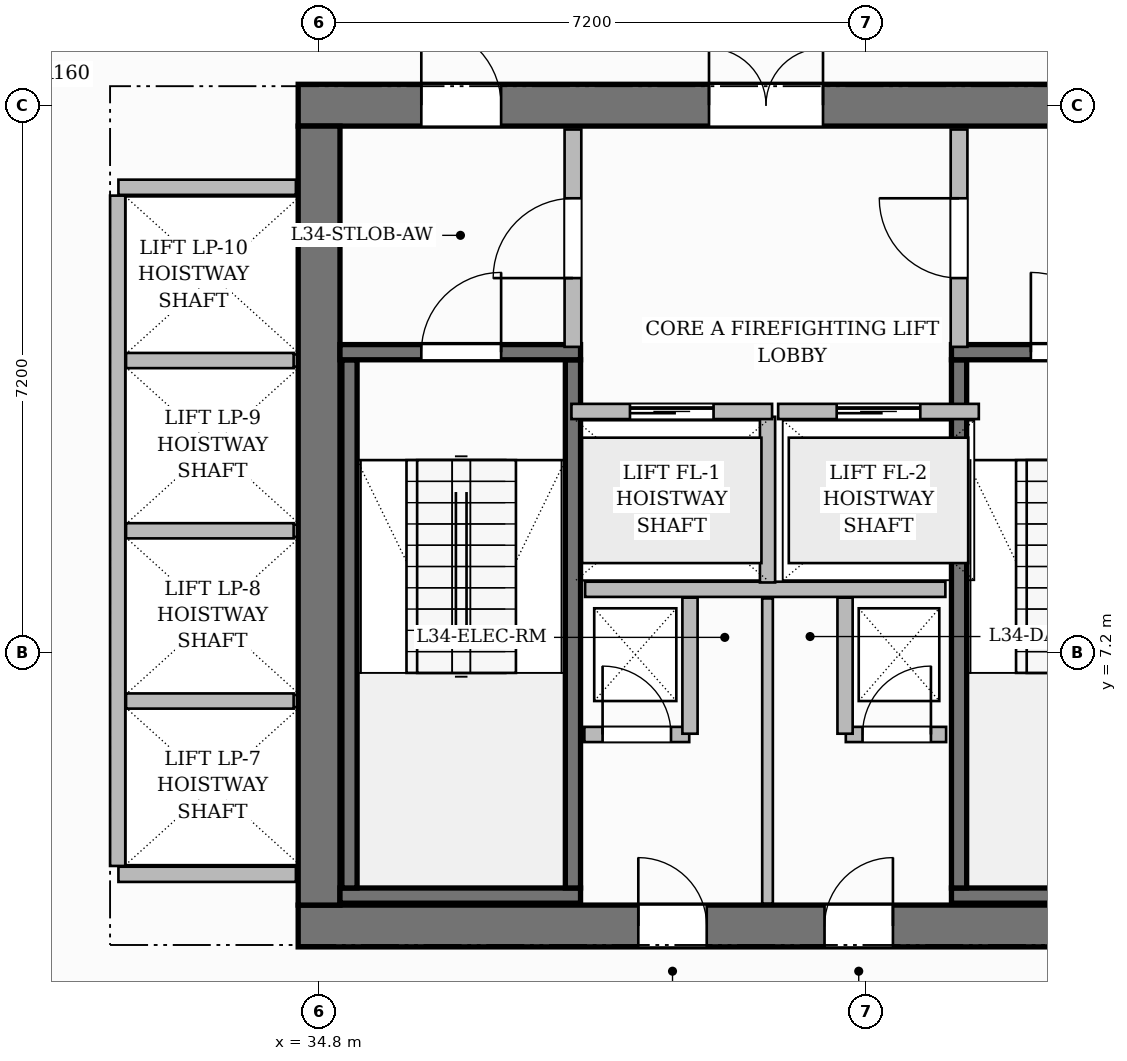
"""IFC4 building model, lengths in metres.
Left out: names, types, materials, properties, quantities, classifications, styles, units other than length and angle.
Written with IfcOpenShell. Run it as: python <this file> out.ifc"""

import sys

from ifc_helpers import new_model, si_unit, direction, frame, frame_2d, origin, place, context, subcontext, project, spatial, rectangle, extrude, source, transform, mapped, element, fill, save


model = new_model("IFC4")
c1 = context("Model", 3, precision=1e-05, world=origin(), true_north=direction((0.0, 1.0)))
c2 = subcontext(c1, "Body", "Model", "MODEL_VIEW")
j1 = project(units=[si_unit("LENGTHUNIT", "METRE"), si_unit("PLANEANGLEUNIT", "RADIAN")], contexts=[c1])
p1 = place(None, origin())
s1 = spatial("IfcSite", under=j1, at=p1, CompositionType="ELEMENT")
p2 = place(p1, origin())
s2 = spatial("IfcBuilding", under=s1, at=p2, CompositionType="ELEMENT")
p3 = place(p2, frame((0.0, 0.0, 137.7)))
s3 = spatial("IfcBuildingStorey", under=s2, at=p3, CompositionType="ELEMENT", Elevation=137.7)
p4 = place(p3, frame((34.525, 3.6, 0.0), z_axis=(0.0, 0.0, 1.0), x_axis=(1.0, 0.0, 0.0)))
e1 = element("IfcWall", 1, at=p4, inside=s3, PredefinedType="SHEAR", context=c2, shape_type="SweptSolid", body=[
    extrude(rectangle(XDim=15.55, YDim=0.55, at=frame_2d((7.775, 0.0))), origin(), (0.0, 0.0, 1.0), 3.7),
])
p5 = place(p4, frame((4.475, 0.0, 0.0)))
e2 = element("IfcOpeningElement", 2, at=p5, cuts=e1, PredefinedType="OPENING", context=c2, shape_type="SweptSolid", body=[
    extrude(rectangle(XDim=0.9, YDim=2.1, at=frame_2d((0.45, 1.05))), frame((0.0, 0.285, 0.0), z_axis=(0.0, -1.0, 0.0), x_axis=(1.0, 0.0, 0.0)), (0.0, 0.0, 1.0), 0.57),
])
p6 = place(p4, frame((6.925, 0.0, 0.0)))
e3 = element("IfcOpeningElement", 3, at=p6, cuts=e1, PredefinedType="OPENING", context=c2, shape_type="SweptSolid", body=[
    extrude(rectangle(XDim=0.9, YDim=2.1, at=frame_2d((0.45, 1.05))), frame((0.0, 0.285, 0.0), z_axis=(0.0, -1.0, 0.0), x_axis=(1.0, 0.0, 0.0)), (0.0, 0.0, 1.0), 0.57),
])
p7 = place(p3, frame((34.525, 14.4, 0.0), z_axis=(0.0, 0.0, 1.0), x_axis=(1.0, 0.0, 0.0)))
e4 = element("IfcWall", 4, at=p7, inside=s3, PredefinedType="SHEAR", context=c2, shape_type="SweptSolid", body=[
    extrude(rectangle(XDim=15.55, YDim=0.55, at=frame_2d((7.775, 0.0))), origin(), (0.0, 0.0, 1.0), 3.7),
])
p8 = place(p7, frame((5.405, 0.0, 0.0)))
e5 = element("IfcOpeningElement", 5, at=p8, cuts=e4, PredefinedType="OPENING", context=c2, shape_type="SweptSolid", body=[
    extrude(rectangle(XDim=1.5, YDim=2.2, at=frame_2d((0.75, 1.1))), frame((0.0, 0.285, 0.0), z_axis=(0.0, -1.0, 0.0), x_axis=(1.0, 0.0, 0.0)), (0.0, 0.0, 1.0), 0.57),
])
p9 = place(p7, frame((1.62, 0.0, 0.0)))
e6 = element("IfcOpeningElement", 6, at=p9, cuts=e4, PredefinedType="OPENING", context=c2, shape_type="SweptSolid", body=[
    extrude(rectangle(XDim=1.05, YDim=2.15, at=frame_2d((0.525, 1.075))), frame((0.0, 0.285, 0.0), z_axis=(0.0, -1.0, 0.0), x_axis=(1.0, 0.0, 0.0)), (0.0, 0.0, 1.0), 0.57),
])
p10 = place(p7, frame((11.25, 0.0, 0.0)))
e7 = element("IfcOpeningElement", 7, at=p10, cuts=e4, PredefinedType="OPENING", context=c2, shape_type="SweptSolid", body=[
    extrude(rectangle(XDim=1.05, YDim=2.15, at=frame_2d((0.525, 1.075))), frame((0.0, 0.285, 0.0), z_axis=(0.0, -1.0, 0.0), x_axis=(1.0, 0.0, 0.0)), (0.0, 0.0, 1.0), 0.57),
])
p11 = place(p3, frame((34.8, 3.875, 0.0), z_axis=(0.0, 0.0, 1.0), x_axis=(0.0, 1.0, 0.0)))
e8 = element("IfcWall", 8, at=p11, inside=s3, PredefinedType="SHEAR", context=c2, shape_type="SweptSolid", body=[
    extrude(rectangle(XDim=10.25, YDim=0.55, at=frame_2d((5.125, 0.0))), origin(), (0.0, 0.0, 1.0), 3.7),
])
p12 = place(p3, frame((35.075, 4.0, 0.0), z_axis=(0.0, 0.0, 1.0), x_axis=(1.0, 0.0, 0.0)))
e9 = element("IfcWall", 9, at=p12, inside=s3, PredefinedType="SHEAR", context=c2, shape_type="SweptSolid", body=[
    extrude(rectangle(XDim=3.165, YDim=0.2, at=frame_2d((1.583, 0.0))), origin(), (0.0, 0.0, 1.0), 3.7),
])
for number, where, z_axis, x_axis in (
    (10, (35.2, 4.1, 0.0), (0.0, 0.0, 1.0), (0.0, 1.0, 0.0)),
    (11, (38.14, 4.1, 0.0), (0.0, 0.0, 1.0), (0.0, 1.0, 0.0)),
):
    element("IfcWall", number, at=place(p3, frame(where, z_axis=z_axis, x_axis=x_axis)), inside=s3, PredefinedType="SHEAR", context=c2, shape_type="SweptSolid", body=[
        extrude(rectangle(XDim=6.95, YDim=0.2, at=frame_2d((3.475, 0.0))), origin(), (0.0, 0.0, 1.0), 3.7),
    ])
p13 = place(p3, frame((35.075, 11.15, 0.0), z_axis=(0.0, 0.0, 1.0), x_axis=(1.0, 0.0, 0.0)))
e12 = element("IfcWall", 12, at=p13, inside=s3, PredefinedType="SHEAR", context=c2, shape_type="SweptSolid", body=[
    extrude(rectangle(XDim=3.165, YDim=0.2, at=frame_2d((1.583, 0.0))), origin(), (0.0, 0.0, 1.0), 3.7),
])
p14 = place(p13, frame((1.07, 0.0, 0.0)))
e13 = element("IfcOpeningElement", 13, at=p14, cuts=e12, PredefinedType="OPENING", context=c2, shape_type="SweptSolid", body=[
    extrude(rectangle(XDim=1.05, YDim=2.2, at=frame_2d((0.525, 1.1))), frame((0.0, 0.11, 0.0), z_axis=(0.0, -1.0, 0.0), x_axis=(1.0, 0.0, 0.0)), (0.0, 0.0, 1.0), 0.22),
])
p15 = place(p3, frame((43.12, 4.0, 0.0), z_axis=(0.0, 0.0, 1.0), x_axis=(1.0, 0.0, 0.0)))
e14 = element("IfcWall", 14, at=p15, inside=s3, PredefinedType="SHEAR", context=c2, shape_type="SweptSolid", body=[
    extrude(rectangle(XDim=6.405, YDim=0.2, at=frame_2d((3.202, 0.0))), origin(), (0.0, 0.0, 1.0), 3.7),
])
p16 = place(p3, frame((43.22, 4.1, 0.0), z_axis=(0.0, 0.0, 1.0), x_axis=(0.0, 1.0, 0.0)))
e15 = element("IfcWall", 15, at=p16, inside=s3, PredefinedType="SHEAR", context=c2, shape_type="SweptSolid", body=[
    extrude(rectangle(XDim=6.95, YDim=0.2, at=frame_2d((3.475, 0.0))), origin(), (0.0, 0.0, 1.0), 3.7),
])
p17 = place(p3, frame((43.12, 11.15, 0.0), z_axis=(0.0, 0.0, 1.0), x_axis=(1.0, 0.0, 0.0)))
e16 = element("IfcWall", 16, at=p17, inside=s3, PredefinedType="SHEAR", context=c2, shape_type="SweptSolid", body=[
    extrude(rectangle(XDim=6.405, YDim=0.2, at=frame_2d((3.202, 0.0))), origin(), (0.0, 0.0, 1.0), 3.7),
])
p18 = place(p17, frame((1.045, 0.0, 0.0)))
e17 = element("IfcOpeningElement", 17, at=p18, cuts=e16, PredefinedType="OPENING", context=c2, shape_type="SweptSolid", body=[
    extrude(rectangle(XDim=1.05, YDim=2.2, at=frame_2d((0.525, 1.1))), frame((0.0, 0.11, 0.0), z_axis=(0.0, -1.0, 0.0), x_axis=(1.0, 0.0, 0.0)), (0.0, 0.0, 1.0), 0.22),
])
p19 = place(p17, frame((4.125, 0.0, 0.0)))
e18 = element("IfcOpeningElement", 18, at=p19, cuts=e16, PredefinedType="OPENING", context=c2, shape_type="SweptSolid", body=[
    extrude(rectangle(XDim=1.05, YDim=2.2, at=frame_2d((0.525, 1.1))), frame((0.0, 0.11, 0.0), z_axis=(0.0, -1.0, 0.0), x_axis=(1.0, 0.0, 0.0)), (0.0, 0.0, 1.0), 0.22),
])
p20 = place(p3, frame((38.3, 8.03, 0.0), z_axis=(0.0, 0.0, 1.0), x_axis=(1.0, 0.0, 0.0)))
e19 = element("IfcWall", 19, at=p20, inside=s3, PredefinedType="PARTITIONING", context=c2, shape_type="SweptSolid", body=[
    extrude(rectangle(XDim=4.74, YDim=0.2, at=frame_2d((2.37, 0.0))), origin(), (0.0, 0.0, 1.0), 3.45),
])
p21 = place(p3, frame((40.7, 8.12, 0.0), z_axis=(0.0, 0.0, 1.0), x_axis=(0.0, 1.0, 0.0)))
e20 = element("IfcWall", 20, at=p21, inside=s3, PredefinedType="PARTITIONING", context=c2, shape_type="SweptSolid", body=[
    extrude(rectangle(XDim=2.18, YDim=0.2, at=frame_2d((1.09, 0.0))), origin(), (0.0, 0.0, 1.0), 3.45),
])
p22 = place(p3, frame((38.14, 11.22, 0.0), z_axis=(0.0, 0.0, 1.0), x_axis=(0.0, 1.0, 0.0)))
e21 = element("IfcWall", 21, at=p22, inside=s3, PredefinedType="PARTITIONING", context=c2, shape_type="SweptSolid", body=[
    extrude(rectangle(XDim=2.86, YDim=0.22, at=frame_2d((1.43, 0.0))), origin(), (0.0, 0.0, 1.0), 3.45),
])
p23 = place(p22, frame((0.905, 0.0, 0.0)))
e22 = element("IfcOpeningElement", 22, at=p23, cuts=e21, PredefinedType="OPENING", context=c2, shape_type="SweptSolid", body=[
    extrude(rectangle(XDim=1.05, YDim=2.15, at=frame_2d((0.525, 1.075))), frame((0.0, 0.12, 0.0), z_axis=(0.0, -1.0, 0.0), x_axis=(1.0, 0.0, 0.0)), (0.0, 0.0, 1.0), 0.24),
])
p24 = place(p3, frame((43.22, 11.22, 0.0), z_axis=(0.0, 0.0, 1.0), x_axis=(0.0, 1.0, 0.0)))
e23 = element("IfcWall", 23, at=p24, inside=s3, PredefinedType="PARTITIONING", context=c2, shape_type="SweptSolid", body=[
    extrude(rectangle(XDim=2.86, YDim=0.22, at=frame_2d((1.43, 0.0))), origin(), (0.0, 0.0, 1.0), 3.45),
])
p25 = place(p24, frame((0.905, 0.0, 0.0)))
e24 = element("IfcOpeningElement", 24, at=p25, cuts=e23, PredefinedType="OPENING", context=c2, shape_type="SweptSolid", body=[
    extrude(rectangle(XDim=1.05, YDim=2.15, at=frame_2d((0.525, 1.075))), frame((0.0, 0.12, 0.0), z_axis=(0.0, -1.0, 0.0), x_axis=(1.0, 0.0, 0.0)), (0.0, 0.0, 1.0), 0.24),
])
p26 = place(p3, frame((38.29, 6.12, 0.0), z_axis=(0.0, 0.0, 1.0), x_axis=(1.0, 0.0, 0.0)))
e25 = element("IfcWall", 25, at=p26, inside=s3, PredefinedType="PARTITIONING", context=c2, shape_type="SweptSolid", body=[
    extrude(rectangle(XDim=1.38, YDim=0.2, at=frame_2d((0.69, 0.0))), origin(), (0.0, 0.0, 1.0), 3.45),
])
p27 = place(p26, frame((0.24, 0.0, 0.0)))
e26 = element("IfcOpeningElement", 26, at=p27, cuts=e25, PredefinedType="OPENING", context=c2, shape_type="SweptSolid", body=[
    extrude(rectangle(XDim=0.9, YDim=2.1, at=frame_2d((0.45, 1.05))), frame((0.0, 0.11, 0.0), z_axis=(0.0, -1.0, 0.0), x_axis=(1.0, 0.0, 0.0)), (0.0, 0.0, 1.0), 0.22),
])
p28 = place(p3, frame((39.68, 6.13, 0.0), z_axis=(0.0, 0.0, 1.0), x_axis=(0.0, 1.0, 0.0)))
e27 = element("IfcWall", 27, at=p28, inside=s3, PredefinedType="PARTITIONING", context=c2, shape_type="SweptSolid", body=[
    extrude(rectangle(XDim=1.79, YDim=0.2, at=frame_2d((0.895, 0.0))), origin(), (0.0, 0.0, 1.0), 3.45),
])
p29 = place(p3, frame((41.73, 6.12, 0.0), z_axis=(0.0, 0.0, 1.0), x_axis=(1.0, 0.0, 0.0)))
e28 = element("IfcWall", 28, at=p29, inside=s3, PredefinedType="PARTITIONING", context=c2, shape_type="SweptSolid", body=[
    extrude(rectangle(XDim=1.32, YDim=0.2, at=frame_2d((0.66, 0.0))), origin(), (0.0, 0.0, 1.0), 3.45),
])
p30 = place(p29, frame((0.22, 0.0, 0.0)))
e29 = element("IfcOpeningElement", 29, at=p30, cuts=e28, PredefinedType="OPENING", context=c2, shape_type="SweptSolid", body=[
    extrude(rectangle(XDim=0.9, YDim=2.1, at=frame_2d((0.45, 1.05))), frame((0.0, 0.11, 0.0), z_axis=(0.0, -1.0, 0.0), x_axis=(1.0, 0.0, 0.0)), (0.0, 0.0, 1.0), 0.22),
])
p31 = place(p3, frame((41.72, 6.13, 0.0), z_axis=(0.0, 0.0, 1.0), x_axis=(0.0, 1.0, 0.0)))
e30 = element("IfcWall", 30, at=p31, inside=s3, PredefinedType="PARTITIONING", context=c2, shape_type="SweptSolid", body=[
    extrude(rectangle(XDim=1.79, YDim=0.2, at=frame_2d((0.895, 0.0))), origin(), (0.0, 0.0, 1.0), 3.45),
])
p32 = place(p3, frame((40.7, 3.895, 0.0), z_axis=(0.0, 0.0, 1.0), x_axis=(0.0, 1.0, 0.0)))
e31 = element("IfcWall", 31, at=p32, inside=s3, PredefinedType="PARTITIONING", context=c2, shape_type="SweptSolid", body=[
    extrude(rectangle(XDim=4.015, YDim=0.14, at=frame_2d((2.007, 0.0))), origin(), (0.0, 0.0, 1.0), 3.45),
])
for number, where, z_axis, x_axis in (
    (32, (32.16, 4.28, 0.0), (0.0, 0.0, 1.0), (1.0, 0.0, 0.0)),
    (33, (32.16, 13.32, 0.0), (0.0, 0.0, 1.0), (1.0, 0.0, 0.0)),
):
    element("IfcWall", number, at=place(p3, frame(where, z_axis=z_axis, x_axis=x_axis)), inside=s3, PredefinedType="PARTITIONING", context=c2, shape_type="SweptSolid", body=[
        extrude(rectangle(XDim=2.335, YDim=0.2, at=frame_2d((1.167, 0.0))), origin(), (0.0, 0.0, 1.0), 3.45),
    ])
p33 = place(p3, frame((32.15, 4.39, 0.0), z_axis=(0.0, 0.0, 1.0), x_axis=(0.0, 1.0, 0.0)))
e34 = element("IfcWall", 34, at=p33, inside=s3, PredefinedType="PARTITIONING", context=c2, shape_type="SweptSolid", body=[
    extrude(rectangle(XDim=8.82, YDim=0.2, at=frame_2d((4.41, 0.0))), origin(), (0.0, 0.0, 1.0), 3.45),
])
for number, where, z_axis, x_axis in (
    (35, (32.26, 6.56, 0.0), (0.0, 0.0, 1.0), (1.0, 0.0, 0.0)),
    (36, (32.26, 8.8, 0.0), (0.0, 0.0, 1.0), (1.0, 0.0, 0.0)),
    (37, (32.26, 11.04, 0.0), (0.0, 0.0, 1.0), (1.0, 0.0, 0.0)),
):
    element("IfcWall", number, at=place(p3, frame(where, z_axis=z_axis, x_axis=x_axis)), inside=s3, PredefinedType="PARTITIONING", context=c2, shape_type="SweptSolid", body=[
        extrude(rectangle(XDim=2.205, YDim=0.2, at=frame_2d((1.103, 0.0))), origin(), (0.0, 0.0, 1.0), 3.45),
    ])
p34 = place(p3, frame((38.12, 10.37, 0.0), z_axis=(0.0, 0.0, 1.0), x_axis=(1.0, 0.0, 0.0)))
e38 = element("IfcWall", 38, at=p34, inside=s3, PredefinedType="PARTITIONING", context=c2, shape_type="SweptSolid", body=[
    extrude(rectangle(XDim=2.64, YDim=0.2, at=frame_2d((1.32, 0.0))), origin(), (0.0, 0.0, 1.0), 3.45),
])
p35 = place(p34, frame((0.77, 0.0, 0.0)))
e39 = element("IfcOpeningElement", 39, at=p35, cuts=e38, PredefinedType="OPENING", context=c2, shape_type="SweptSolid", body=[
    extrude(rectangle(XDim=1.1, YDim=2.2, at=frame_2d((0.55, 1.1))), frame((0.0, 0.11, 0.0), z_axis=(0.0, -1.0, 0.0), x_axis=(1.0, 0.0, 0.0)), (0.0, 0.0, 1.0), 0.22),
])
p36 = place(p3, frame((40.84, 10.37, 0.0), z_axis=(0.0, 0.0, 1.0), x_axis=(1.0, 0.0, 0.0)))
e40 = element("IfcWall", 40, at=p36, inside=s3, PredefinedType="PARTITIONING", context=c2, shape_type="SweptSolid", body=[
    extrude(rectangle(XDim=2.64, YDim=0.2, at=frame_2d((1.32, 0.0))), origin(), (0.0, 0.0, 1.0), 3.45),
])
p37 = place(p36, frame((0.77, 0.0, 0.0)))
e41 = element("IfcOpeningElement", 41, at=p37, cuts=e40, PredefinedType="OPENING", context=c2, shape_type="SweptSolid", body=[
    extrude(rectangle(XDim=1.1, YDim=2.2, at=frame_2d((0.55, 1.1))), frame((0.0, 0.11, 0.0), z_axis=(0.0, -1.0, 0.0), x_axis=(1.0, 0.0, 0.0)), (0.0, 0.0, 1.0), 0.22),
])
m1 = source(origin(), c2, "Body", "SweptSolid", [
    extrude(rectangle(XDim=1.05, YDim=2.2, at=frame_2d((0.525, 1.1))), frame((0.0, 0.025, 0.0), z_axis=(0.0, -1.0, 0.0), x_axis=(1.0, 0.0, 0.0)), (0.0, 0.0, 1.0), 0.05),
])
p38 = place(p14, origin())
e42 = element("IfcDoor", 42, at=p38, inside=s3, OperationType="SINGLE_SWING_RIGHT", PredefinedType="DOOR", context=c2, shape_type="MappedRepresentation", body=[
    mapped(m1, transform((0.0, 0.0, 0.0), scale=1.0)),
])
fill(e13, e42)
p39 = place(p18, origin())
e43 = element("IfcDoor", 43, at=p39, inside=s3, OperationType="SINGLE_SWING_LEFT", PredefinedType="DOOR", context=c2, shape_type="MappedRepresentation", body=[
    mapped(m1, transform((0.0, 0.0, 0.0), scale=1.0)),
])
fill(e17, e43)
m2 = source(origin(), c2, "Body", "SweptSolid", [
    extrude(rectangle(XDim=1.05, YDim=2.15, at=frame_2d((0.525, 1.075))), frame((0.0, 0.025, 0.0), z_axis=(0.0, -1.0, 0.0), x_axis=(1.0, 0.0, 0.0)), (0.0, 0.0, 1.0), 0.05),
])
p40 = place(p23, origin())
e44 = element("IfcDoor", 44, at=p40, inside=s3, OperationType="SINGLE_SWING_LEFT", PredefinedType="DOOR", context=c2, shape_type="MappedRepresentation", body=[
    mapped(m2, transform((0.0, 0.0, 0.0), scale=1.0)),
])
fill(e22, e44)
p41 = place(p25, origin())
e45 = element("IfcDoor", 45, at=p41, inside=s3, OperationType="SINGLE_SWING_RIGHT", PredefinedType="DOOR", context=c2, shape_type="MappedRepresentation", body=[
    mapped(m2, transform((0.0, 0.0, 0.0), scale=1.0)),
])
fill(e24, e45)
m3 = source(origin(), c2, "Body", "SweptSolid", [
    extrude(rectangle(XDim=1.5, YDim=2.2, at=frame_2d((0.75, 1.1))), frame((0.0, 0.025, 0.0), z_axis=(0.0, -1.0, 0.0), x_axis=(1.0, 0.0, 0.0)), (0.0, 0.0, 1.0), 0.05),
])
p42 = place(p8, origin())
e46 = element("IfcDoor", 46, at=p42, inside=s3, OperationType="DOUBLE_DOOR_SINGLE_SWING", PredefinedType="DOOR", context=c2, shape_type="MappedRepresentation", body=[
    mapped(m3, transform((0.0, 0.0, 0.0), scale=1.0)),
])
fill(e5, e46)
p43 = place(p9, origin())
e47 = element("IfcDoor", 47, at=p43, inside=s3, OperationType="SINGLE_SWING_LEFT", PredefinedType="DOOR", context=c2, shape_type="MappedRepresentation", body=[
    mapped(m2, transform((0.0, 0.0, 0.0), scale=1.0)),
])
fill(e6, e47)
m4 = source(origin(), c2, "Body", "SweptSolid", [
    extrude(rectangle(XDim=0.9, YDim=2.1, at=frame_2d((0.45, 1.05))), frame((0.0, 0.025, 0.0), z_axis=(0.0, -1.0, 0.0), x_axis=(1.0, 0.0, 0.0)), (0.0, 0.0, 1.0), 0.05),
])
p44 = place(p27, origin())
e48 = element("IfcDoor", 48, at=p44, inside=s3, OperationType="SINGLE_SWING_LEFT", PredefinedType="DOOR", context=c2, shape_type="MappedRepresentation", body=[
    mapped(m4, transform((0.0, 0.0, 0.0), scale=1.0)),
])
fill(e26, e48)
p45 = place(p30, origin())
e49 = element("IfcDoor", 49, at=p45, inside=s3, OperationType="SINGLE_SWING_RIGHT", PredefinedType="DOOR", context=c2, shape_type="MappedRepresentation", body=[
    mapped(m4, transform((0.0, 0.0, 0.0), scale=1.0)),
])
fill(e29, e49)
p46 = place(p5, origin())
e50 = element("IfcDoor", 50, at=p46, inside=s3, OperationType="SINGLE_SWING_LEFT", PredefinedType="DOOR", context=c2, shape_type="MappedRepresentation", body=[
    mapped(m4, transform((0.0, 0.0, 0.0), scale=1.0)),
])
fill(e2, e50)
p47 = place(p6, origin())
e51 = element("IfcDoor", 51, at=p47, inside=s3, OperationType="SINGLE_SWING_RIGHT", PredefinedType="DOOR", context=c2, shape_type="MappedRepresentation", body=[
    mapped(m4, transform((0.0, 0.0, 0.0), scale=1.0)),
])
fill(e3, e51)
m5 = source(origin(), c2, "Body", "SweptSolid", [
    extrude(rectangle(XDim=1.1, YDim=2.2, at=frame_2d((0.55, 1.1))), frame((0.0, 0.025, 0.0), z_axis=(0.0, -1.0, 0.0), x_axis=(1.0, 0.0, 0.0)), (0.0, 0.0, 1.0), 0.05),
])
p48 = place(p35, origin())
e52 = element("IfcDoor", 52, at=p48, inside=s3, OperationType="SLIDING_TO_LEFT", PredefinedType="DOOR", context=c2, shape_type="MappedRepresentation", body=[
    mapped(m5, transform((0.0, 0.0, 0.0), scale=1.0)),
])
fill(e39, e52)
p49 = place(p37, origin())
e53 = element("IfcDoor", 53, at=p49, inside=s3, OperationType="SLIDING_TO_LEFT", PredefinedType="DOOR", context=c2, shape_type="MappedRepresentation", body=[
    mapped(m5, transform((0.0, 0.0, 0.0), scale=1.0)),
])
fill(e41, e53)
save(model, sys.argv[1])
